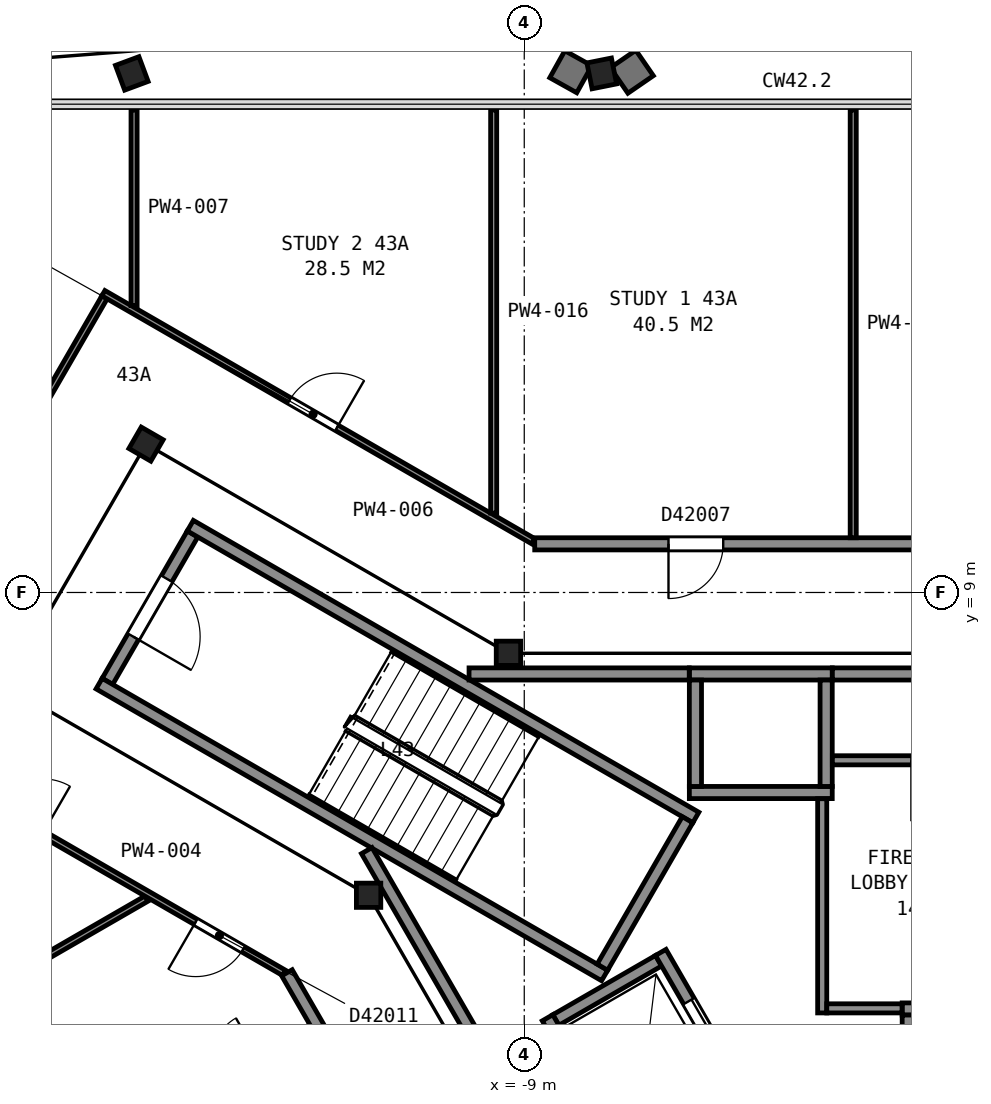
"""IFC4 building model, lengths in metres.
Left out: names, types, materials, properties, quantities, classifications, styles, units other than length and angle.
Written with IfcOpenShell. Run it as: python <this file> out.ifc"""

import sys

from ifc_helpers import new_model, si_unit, direction, frame, frame_2d, origin, origin_2d, place, context, subcontext, project, spatial, rectangle, i_section, extrude, element, fill, save


model = new_model("IFC4")
c1 = context("Model", 3, precision=1e-05, world=origin(), true_north=direction((0.0, 1.0)))
c2 = subcontext(c1, "Body", "Model", "MODEL_VIEW")
j1 = project(units=[si_unit("LENGTHUNIT", "METRE"), si_unit("PLANEANGLEUNIT", "RADIAN")], contexts=[c1])
p1 = place(None, origin())
s1 = spatial("IfcSite", under=j1, at=p1, CompositionType="ELEMENT")
p2 = place(p1, origin())
s2 = spatial("IfcBuilding", under=s1, at=p2, CompositionType="ELEMENT")
p3 = place(p2, frame((0.0, 0.0, 174.7)))
s3 = spatial("IfcBuildingStorey", under=s2, at=p3, CompositionType="ELEMENT", Elevation=174.7)
p4 = place(p3, frame((-7.681, 17.317, 0.035), z_axis=(-0.037114816882, 0.18577220621, 0.981891632395), x_axis=(0.999284884786, -0.000205075441, 0.037811069577)))
e1 = element("IfcColumn", 1, at=p4, inside=s3, PredefinedType="COLUMN", context=c2, shape_type="SweptSolid", body=[
    extrude(i_section(OverallWidth=0.411, OverallDepth=0.434, WebThickness=0.036, FlangeThickness=0.057, FilletRadius=0.015, at=origin_2d()), origin(), (0.0, 0.0, 1.0), 3.697),
])
p5 = place(p3, frame((-15.373, 17.318, 0.04), z_axis=(-0.06888386825, 0.185431142459, 0.980239921704), x_axis=(0.997540564772, 4.290776e-05, 0.070091510131)))
e2 = element("IfcColumn", 2, at=p5, inside=s3, PredefinedType="COLUMN", context=c2, shape_type="SweptSolid", body=[
    extrude(i_section(OverallWidth=0.411, OverallDepth=0.434, WebThickness=0.036, FlangeThickness=0.057, FilletRadius=0.015, at=origin_2d()), origin(), (0.0, 0.0, 1.0), 3.693),
])
p6 = place(p3, frame((-9.26, 8.0, 0.0), z_axis=(0.0, 0.0, 1.0), x_axis=(1.0, 0.0, 0.0)))
e3 = element("IfcColumn", 3, at=p6, inside=s3, PredefinedType="COLUMN", context=c2, shape_type="SweptSolid", body=[
    extrude(i_section(OverallWidth=0.401, OverallDepth=0.399, WebThickness=0.025, FlangeThickness=0.04, FilletRadius=0.015, at=origin_2d()), origin(), (0.0, 0.0, 1.0), 3.7),
])
p7 = place(p3, frame((-15.22, 11.44, 0.0), z_axis=(0.0, 0.0, 1.0), x_axis=(0.5, 0.866025403784, 0.0)))
e4 = element("IfcColumn", 4, at=p7, inside=s3, PredefinedType="COLUMN", context=c2, shape_type="SweptSolid", body=[
    extrude(i_section(OverallWidth=0.406, OverallDepth=0.417, WebThickness=0.03, FlangeThickness=0.048, FilletRadius=0.015, at=origin_2d()), origin(), (0.0, 0.0, 1.0), 3.7),
])
p8 = place(p3, frame((-11.56, 4.02, 0.0), z_axis=(0.0, 0.0, 1.0), x_axis=(1.0, 0.0, 0.0)))
e5 = element("IfcColumn", 5, at=p8, inside=s3, PredefinedType="COLUMN", context=c2, shape_type="SweptSolid", body=[
    extrude(i_section(OverallWidth=0.401, OverallDepth=0.399, WebThickness=0.025, FlangeThickness=0.04, FilletRadius=0.015, at=origin_2d()), origin(), (0.0, 0.0, 1.0), 3.7),
])
p9 = place(p3, frame((-14.455, 9.962, 0.0), z_axis=(0.0, 0.0, 1.0), x_axis=(-0.500049511043, -0.865996816683, 0.0)))
e6 = element("IfcWall", 6, at=p9, inside=s3, PredefinedType="PARTITIONING", context=c2, shape_type="SweptSolid", body=[
    extrude(rectangle(XDim=2.8, YDim=0.2, at=frame_2d((1.4, 0.0))), origin(), (0.0, 0.0, 1.0), 3.45),
])
p10 = place(p9, frame((0.85, 0.0, 0.0)))
e7 = element("IfcOpeningElement", 7, at=p10, cuts=e6, PredefinedType="OPENING", context=c2, shape_type="SweptSolid", body=[
    extrude(rectangle(XDim=1.1, YDim=2.1, at=frame_2d((0.55, 1.05))), frame((0.0, 0.11, 0.0), z_axis=(0.0, -1.0, 0.0), x_axis=(1.0, 0.0, 0.0)), (0.0, 0.0, 1.0), 0.22),
])
for number, where, z_axis, x_axis in (
    (8, (-7.678, 2.701, 0.0), (0.0, 0.0, 1.0), (-0.866, 0.5, 0.0)),
    (9, (-6.178, 5.299, 0.0), (0.0, 0.0, 1.0), (-0.866, 0.5, 0.0)),
):
    element("IfcWall", number, at=place(p3, frame(where, z_axis=z_axis, x_axis=x_axis)), inside=s3, PredefinedType="PARTITIONING", context=c2, shape_type="SweptSolid", body=[
        extrude(rectangle(XDim=9.6, YDim=0.2, at=frame_2d((4.8, 0.0))), origin(), (0.0, 0.0, 1.0), 3.45),
    ])
p11 = place(p3, frame((-6.315, 5.262, 0.0), z_axis=(0.0, 0.0, 1.0), x_axis=(-0.500049511043, -0.865996816683, 0.0)))
e10 = element("IfcWall", 10, at=p11, inside=s3, PredefinedType="PARTITIONING", context=c2, shape_type="SweptSolid", body=[
    extrude(rectangle(XDim=2.8, YDim=0.2, at=frame_2d((1.4, 0.0))), origin(), (0.0, 0.0, 1.0), 3.45),
])
p12 = place(p3, frame((-2.785, 2.15, 0.0), z_axis=(0.0, 0.0, 1.0), x_axis=(1.0, 0.0, 0.0)))
e11 = element("IfcWall", 11, at=p12, inside=s3, PredefinedType="PARTITIONING", context=c2, shape_type="SweptSolid", body=[
    extrude(rectangle(XDim=2.95, YDim=0.2, at=frame_2d((1.475, 0.0))), origin(), (0.0, 0.0, 1.0), 3.7),
])
p13 = place(p12, frame((0.925, 0.0, 0.0)))
e12 = element("IfcOpeningElement", 12, at=p13, cuts=e11, PredefinedType="OPENING", context=c2, shape_type="SweptSolid", body=[
    extrude(rectangle(XDim=1.1, YDim=2.1, at=frame_2d((0.55, 1.05))), frame((0.0, 0.11, 0.0), z_axis=(0.0, -1.0, 0.0), x_axis=(1.0, 0.0, 0.0)), (0.0, 0.0, 1.0), 0.22),
])
for number, where, z_axis, x_axis in (
    (13, (-6.285, 5.71, 0.0), (0.0, 0.0, 1.0), (1.0, 0.0, 0.0)),
    (14, (-6.285, 7.66, 0.0), (0.0, 0.0, 1.0), (1.0, 0.0, 0.0)),
):
    element("IfcWall", number, at=place(p3, frame(where, z_axis=z_axis, x_axis=x_axis)), inside=s3, PredefinedType="PARTITIONING", context=c2, shape_type="SweptSolid", body=[
        extrude(rectangle(XDim=2.35, YDim=0.2, at=frame_2d((1.175, 0.0))), origin(), (0.0, 0.0, 1.0), 3.7),
    ])
for number, where, z_axis, x_axis in (
    (15, (-8.48, 1.969, 0.0), (0.0, 0.0, 1.0), (0.866, 0.5, 0.0)),
    (16, (-2.685, 0.1, 0.0), (0.0, 0.0, 1.0), (0.0, 1.0, 0.0)),
):
    element("IfcWall", number, at=place(p3, frame(where, z_axis=z_axis, x_axis=x_axis)), inside=s3, PredefinedType="PARTITIONING", context=c2, shape_type="SweptSolid", body=[
        extrude(rectangle(XDim=1.95, YDim=0.2, at=frame_2d((0.975, 0.0))), origin(), (0.0, 0.0, 1.0), 3.7),
    ])
for number, where, z_axis, x_axis in (
    (17, (-4.035, 5.81, 0.0), (0.0, 0.0, 1.0), (0.0, 1.0, 0.0)),
    (18, (-6.185, 5.81, 0.0), (0.0, 0.0, 1.0), (0.0, 1.0, 0.0)),
):
    element("IfcWall", number, at=place(p3, frame(where, z_axis=z_axis, x_axis=x_axis)), inside=s3, PredefinedType="PARTITIONING", context=c2, shape_type="SweptSolid", body=[
        extrude(rectangle(XDim=1.75, YDim=0.2, at=frame_2d((0.875, 0.0))), origin(), (0.0, 0.0, 1.0), 3.7),
    ])
p14 = place(p3, frame((-5.28, 0.525, 0.0), z_axis=(0.0, 0.0, 1.0), x_axis=(-0.500037662692, 0.866003658127, 0.0)))
e19 = element("IfcWall", 19, at=p14, inside=s3, PredefinedType="PARTITIONING", context=c2, shape_type="SweptSolid", body=[
    extrude(rectangle(XDim=2.95, YDim=0.2, at=frame_2d((1.475, 0.0))), origin(), (0.0, 0.0, 1.0), 3.7),
])
p15 = place(p14, frame((0.925, 0.0, 0.0)))
e20 = element("IfcOpeningElement", 20, at=p15, cuts=e19, PredefinedType="OPENING", context=c2, shape_type="SweptSolid", body=[
    extrude(rectangle(XDim=1.1, YDim=2.1, at=frame_2d((0.55, 1.05))), frame((0.0, 0.11, 0.0), z_axis=(0.0, -1.0, 0.0), x_axis=(1.0, 0.0, 0.0)), (0.0, 0.0, 1.0), 0.22),
])
p16 = place(p3, frame((-7.242, -0.376, 0.0), z_axis=(0.0, 0.0, 1.0), x_axis=(-0.499996545922, 0.866027397988, 0.0)))
e21 = element("IfcWall", 21, at=p16, inside=s3, PredefinedType="PARTITIONING", context=c2, shape_type="SweptSolid", body=[
    extrude(rectangle(XDim=2.75, YDim=0.2, at=frame_2d((1.375, 0.0))), origin(), (0.0, 0.0, 1.0), 3.7),
])
p17 = place(p3, frame((-11.591, 4.755, 0.0), z_axis=(0.0, 0.0, 1.0), x_axis=(0.500043977787, -0.866000011708, 0.0)))
e22 = element("IfcWall", 22, at=p17, inside=s3, PredefinedType="PARTITIONING", context=c2, shape_type="SweptSolid", body=[
    extrude(rectangle(XDim=6.617, YDim=0.2, at=frame_2d((3.308, 0.0))), origin(), (0.0, 0.0, 1.0), 3.45),
])
p18 = place(p17, frame((3.695, 0.0, 0.0)))
e23 = element("IfcOpeningElement", 23, at=p18, cuts=e22, PredefinedType="OPENING", context=c2, shape_type="SweptSolid", body=[
    extrude(rectangle(XDim=1.8, YDim=2.1, at=frame_2d((0.9, 1.05))), frame((0.0, 0.11, 0.0), z_axis=(0.0, -1.0, 0.0), x_axis=(1.0, 0.0, 0.0)), (0.0, 0.0, 1.0), 0.22),
])
p19 = place(p3, frame((-9.908, 7.66, 0.0), z_axis=(0.0, 0.0, 1.0), x_axis=(1.0, 0.0, 0.0)))
e24 = element("IfcWall", 24, at=p19, inside=s3, PredefinedType="PARTITIONING", context=c2, shape_type="SweptSolid", body=[
    extrude(rectangle(XDim=3.621, YDim=0.2, at=frame_2d((1.811, 0.0))), origin(), (0.0, 0.0, 1.0), 3.45),
])
p20 = place(p3, frame((-4.1, 2.085, 0.0), z_axis=(0.0, 0.0, 1.0), x_axis=(0.0, 1.0, 0.0)))
e25 = element("IfcWall", 25, at=p20, inside=s3, PredefinedType="PARTITIONING", context=c2, shape_type="SweptSolid", body=[
    extrude(rectangle(XDim=3.523, YDim=0.15, at=frame_2d((1.761, 0.0))), origin(), (0.0, 0.0, 1.0), 3.45),
])
p21 = place(p3, frame((-4.025, 2.16, 0.0), z_axis=(0.0, 0.0, 1.0), x_axis=(1.0, 0.0, 0.0)))
e26 = element("IfcWall", 26, at=p21, inside=s3, PredefinedType="PARTITIONING", context=c2, shape_type="SweptSolid", body=[
    extrude(rectangle(XDim=1.238, YDim=0.15, at=frame_2d((0.619, 0.0))), origin(), (0.0, 0.0, 1.0), 3.45),
])
p22 = place(p3, frame((-3.933, 6.24, 0.0), z_axis=(0.0, 0.0, 1.0), x_axis=(1.0, 0.0, 0.0)))
e27 = element("IfcWall", 27, at=p22, inside=s3, PredefinedType="PARTITIONING", context=c2, shape_type="SweptSolid", body=[
    extrude(rectangle(XDim=3.538, YDim=0.15, at=frame_2d((1.769, 0.0))), origin(), (0.0, 0.0, 1.0), 3.45),
])
p23 = place(p22, frame((1.3, 0.0, 0.0)))
e28 = element("IfcOpeningElement", 28, at=p23, cuts=e27, PredefinedType="OPENING", context=c2, shape_type="SweptSolid", body=[
    extrude(rectangle(XDim=1.0, YDim=2.1, at=frame_2d((0.5, 1.05))), frame((0.0, 0.085, 0.0), z_axis=(0.0, -1.0, 0.0), x_axis=(1.0, 0.0, 0.0)), (0.0, 0.0, 1.0), 0.17),
])
p24 = place(p3, frame((-3.933, 7.66, 0.0), z_axis=(0.0, 0.0, 1.0), x_axis=(1.0, 0.0, 0.0)))
e29 = element("IfcWall", 29, at=p24, inside=s3, PredefinedType="PARTITIONING", context=c2, shape_type="SweptSolid", body=[
    extrude(rectangle(XDim=13.841, YDim=0.2, at=frame_2d((6.92, 0.0))), origin(), (0.0, 0.0, 1.0), 3.45),
])
p25 = place(p3, frame((-20.187, 1.094, 0.0), z_axis=(0.0, 0.0, 1.0), x_axis=(0.866060256018, 0.499939629302, 0.0)))
e30 = element("IfcWall", 30, at=p25, inside=s3, PredefinedType="PARTITIONING", context=c2, shape_type="SweptSolid", body=[
    extrude(rectangle(XDim=5.741, YDim=0.1, at=frame_2d((2.871, 0.0))), origin(), (0.0, 0.0, 1.0), 2.713),
])
p26 = place(p3, frame((-19.955, 6.844, 0.0), z_axis=(0.0, 0.0, 1.0), x_axis=(0.500415732313, 0.865785247537, 0.0)))
e31 = element("IfcWall", 31, at=p26, inside=s3, PredefinedType="PARTITIONING", context=c2, shape_type="SweptSolid", body=[
    extrude(rectangle(XDim=8.097, YDim=0.1, at=frame_2d((4.049, 0.0))), origin(), (0.0, 0.0, 1.0), 2.713),
])
p27 = place(p26, frame((3.45, 0.0, 0.0)))
e32 = element("IfcOpeningElement", 32, at=p27, cuts=e31, PredefinedType="OPENING", context=c2, shape_type="SweptSolid", body=[
    extrude(rectangle(XDim=1.2, YDim=2.1, at=frame_2d((0.6, 1.05))), frame((0.0, 0.06, 0.0), z_axis=(0.0, -1.0, 0.0), x_axis=(1.0, 0.0, 0.0)), (0.0, 0.0, 1.0), 0.12),
])
p28 = place(p3, frame((-12.952, 2.744, 0.0), z_axis=(0.0, 0.0, 1.0), x_axis=(-0.86608949446, 0.499888975259, 0.0)))
e33 = element("IfcWall", 33, at=p28, inside=s3, PredefinedType="PARTITIONING", context=c2, shape_type="SweptSolid", body=[
    extrude(rectangle(XDim=8.165, YDim=0.1, at=frame_2d((4.083, 0.0))), origin(), (0.0, 0.0, 1.0), 2.713),
])
p29 = place(p28, frame((4.581, 0.0, 0.0)))
e34 = element("IfcOpeningElement", 34, at=p29, cuts=e33, PredefinedType="OPENING", context=c2, shape_type="SweptSolid", body=[
    extrude(rectangle(XDim=0.9, YDim=2.1, at=frame_2d((0.45, 1.05))), frame((0.0, 0.06, 0.0), z_axis=(0.0, -1.0, 0.0), x_axis=(1.0, 0.0, 0.0)), (0.0, 0.0, 1.0), 0.12),
])
p30 = place(p28, frame((0.776, 0.0, 0.0)))
e35 = element("IfcOpeningElement", 35, at=p30, cuts=e33, PredefinedType="OPENING", context=c2, shape_type="SweptSolid", body=[
    extrude(rectangle(XDim=0.9, YDim=2.1, at=frame_2d((0.45, 1.05))), frame((0.0, 0.06, 0.0), z_axis=(0.0, -1.0, 0.0), x_axis=(1.0, 0.0, 0.0)), (0.0, 0.0, 1.0), 0.12),
])
p31 = place(p3, frame((-15.921, 13.923, 0.0), z_axis=(0.0, 0.0, 1.0), x_axis=(0.866088973199, -0.499889878377, 0.0)))
e36 = element("IfcWall", 36, at=p31, inside=s3, PredefinedType="PARTITIONING", context=c2, shape_type="SweptSolid", body=[
    extrude(rectangle(XDim=8.163, YDim=0.1, at=frame_2d((4.082, 0.0))), origin(), (0.0, 0.0, 1.0), 2.713),
])
p32 = place(p31, frame((3.532, 0.0, 0.0)))
e37 = element("IfcOpeningElement", 37, at=p32, cuts=e36, PredefinedType="OPENING", context=c2, shape_type="SweptSolid", body=[
    extrude(rectangle(XDim=0.9, YDim=2.1, at=frame_2d((0.45, 1.05))), frame((0.0, 0.06, 0.0), z_axis=(0.0, -1.0, 0.0), x_axis=(1.0, 0.0, 0.0)), (0.0, 0.0, 1.0), 0.12),
])
p33 = place(p3, frame((-15.417, 13.719, 0.0), z_axis=(0.0, 0.0, 1.0), x_axis=(0.0, 1.0, 0.0)))
e38 = element("IfcWall", 38, at=p33, inside=s3, PredefinedType="PARTITIONING", context=c2, shape_type="SweptSolid", body=[
    extrude(rectangle(XDim=3.217, YDim=0.1, at=frame_2d((1.608, 0.0))), origin(), (0.0, 0.0, 1.0), 2.713),
])
p34 = place(p3, frame((-12.481, 1.805, 0.0), z_axis=(0.0, 0.0, 1.0), x_axis=(-0.866052556263, -0.499952967579, 0.0)))
e39 = element("IfcWall", 39, at=p34, inside=s3, PredefinedType="PARTITIONING", context=c2, shape_type="SweptSolid", body=[
    extrude(rectangle(XDim=2.995, YDim=0.2, at=frame_2d((1.498, 0.0))), origin(), (0.0, 0.0, 1.0), 2.713),
])
p35 = place(p34, frame((0.995, 0.0, 0.0)))
e40 = element("IfcOpeningElement", 40, at=p35, cuts=e39, PredefinedType="OPENING", context=c2, shape_type="SweptSolid", body=[
    extrude(rectangle(XDim=0.8, YDim=2.1, at=frame_2d((0.4, 1.05))), frame((0.0, 0.11, 0.0), z_axis=(0.0, -1.0, 0.0), x_axis=(1.0, 0.0, 0.0)), (0.0, 0.0, 1.0), 0.22),
])
p36 = place(p3, frame((-4.075, -12.545, 0.0), z_axis=(0.0, 0.0, 1.0), x_axis=(-0.499999743747, 0.866025551732, 0.0)))
e41 = element("IfcWall", 41, at=p36, inside=s3, PredefinedType="PARTITIONING", context=c2, shape_type="SweptSolid", body=[
    extrude(rectangle(XDim=17.656, YDim=0.2, at=frame_2d((8.828, 0.0))), origin(), (0.0, 0.0, 1.0), 2.713),
])
p37 = place(p36, frame((10.08, 0.0, 0.0)))
e42 = element("IfcOpeningElement", 42, at=p37, cuts=e41, PredefinedType="OPENING", context=c2, shape_type="SweptSolid", body=[
    extrude(rectangle(XDim=0.9, YDim=2.1, at=frame_2d((0.45, 1.05))), frame((0.0, 0.11, 0.0), z_axis=(0.0, -1.0, 0.0), x_axis=(1.0, 0.0, 0.0)), (0.0, 0.0, 1.0), 0.22),
])
p38 = place(p36, frame((6.068, 0.0, 0.0)))
e43 = element("IfcOpeningElement", 43, at=p38, cuts=e41, PredefinedType="OPENING", context=c2, shape_type="SweptSolid", body=[
    extrude(rectangle(XDim=0.9, YDim=2.1, at=frame_2d((0.45, 1.05))), frame((0.0, 0.11, 0.0), z_axis=(0.0, -1.0, 0.0), x_axis=(1.0, 0.0, 0.0)), (0.0, 0.0, 1.0), 0.22),
])
p39 = place(p3, frame((-9.503, 10.306, 0.0), z_axis=(0.0, 0.0, 1.0), x_axis=(0.0, 1.0, 0.0)))
e44 = element("IfcWall", 44, at=p39, inside=s3, PredefinedType="PARTITIONING", context=c2, shape_type="SweptSolid", body=[
    extrude(rectangle(XDim=6.629, YDim=0.1, at=frame_2d((3.315, 0.0))), origin(), (0.0, 0.0, 1.0), 2.713),
])
p40 = place(p3, frame((-8.828, 9.8, 0.0), z_axis=(0.0, 0.0, 1.0), x_axis=(1.0, 0.0, 0.0)))
e45 = element("IfcWall", 45, at=p40, inside=s3, PredefinedType="PARTITIONING", context=c2, shape_type="SweptSolid", body=[
    extrude(rectangle(XDim=17.656, YDim=0.2, at=frame_2d((8.828, 0.0))), origin(), (0.0, 0.0, 1.0), 2.713),
])
p41 = place(p40, frame((14.864, 0.0, 0.0)))
e46 = element("IfcOpeningElement", 46, at=p41, cuts=e45, PredefinedType="OPENING", context=c2, shape_type="SweptSolid", body=[
    extrude(rectangle(XDim=0.9, YDim=2.1, at=frame_2d((0.45, 1.05))), frame((0.0, 0.11, 0.0), z_axis=(0.0, -1.0, 0.0), x_axis=(1.0, 0.0, 0.0)), (0.0, 0.0, 1.0), 0.22),
])
p42 = place(p40, frame((6.488, 0.0, 0.0)))
e47 = element("IfcOpeningElement", 47, at=p42, cuts=e45, PredefinedType="OPENING", context=c2, shape_type="SweptSolid", body=[
    extrude(rectangle(XDim=0.9, YDim=2.1, at=frame_2d((0.45, 1.05))), frame((0.0, 0.11, 0.0), z_axis=(0.0, -1.0, 0.0), x_axis=(1.0, 0.0, 0.0)), (0.0, 0.0, 1.0), 0.22),
])
p43 = place(p40, frame((2.2, 0.0, 0.0)))
e48 = element("IfcOpeningElement", 48, at=p43, cuts=e45, PredefinedType="OPENING", context=c2, shape_type="SweptSolid", body=[
    extrude(rectangle(XDim=0.9, YDim=2.1, at=frame_2d((0.45, 1.05))), frame((0.0, 0.11, 0.0), z_axis=(0.0, -1.0, 0.0), x_axis=(1.0, 0.0, 0.0)), (0.0, 0.0, 1.0), 0.22),
])
p44 = place(p3, frame((-3.59, 9.9, 0.0), z_axis=(0.0, 0.0, 1.0), x_axis=(0.0, 1.0, 0.0)))
e49 = element("IfcWall", 49, at=p44, inside=s3, PredefinedType="PARTITIONING", context=c2, shape_type="SweptSolid", body=[
    extrude(rectangle(XDim=7.035, YDim=0.1, at=frame_2d((3.518, 0.0))), origin(), (0.0, 0.0, 1.0), 2.713),
])
p45 = place(p10, origin())
e50 = element("IfcDoor", 50, at=p45, inside=s3, OperationType="SINGLE_SWING_RIGHT", PredefinedType="DOOR", context=c2, shape_type="SweptSolid", body=[
    extrude(rectangle(XDim=1.1, YDim=2.1, at=frame_2d((0.55, 1.05))), frame((0.0, 0.025, 0.0), z_axis=(0.0, -1.0, 0.0), x_axis=(1.0, 0.0, 0.0)), (0.0, 0.0, 1.0), 0.05),
])
fill(e7, e50)
p46 = place(p15, origin())
e51 = element("IfcDoor", 51, at=p46, inside=s3, OperationType="SLIDING_TO_LEFT", PredefinedType="DOOR", context=c2, shape_type="SweptSolid", body=[
    extrude(rectangle(XDim=1.1, YDim=2.1, at=frame_2d((0.55, 1.05))), frame((0.0, 0.025, 0.0), z_axis=(0.0, -1.0, 0.0), x_axis=(1.0, 0.0, 0.0)), (0.0, 0.0, 1.0), 0.05),
])
fill(e20, e51)
p47 = place(p30, origin())
e52 = element("IfcDoor", 52, at=p47, inside=s3, OperationType="SINGLE_SWING_RIGHT", PredefinedType="DOOR", context=c2, shape_type="SweptSolid", body=[
    extrude(rectangle(XDim=0.9, YDim=2.1, at=frame_2d((0.45, 1.05))), frame((0.0, 0.025, 0.0), z_axis=(0.0, -1.0, 0.0), x_axis=(1.0, 0.0, 0.0)), (0.0, 0.0, 1.0), 0.05),
])
fill(e35, e52)
p48 = place(p32, origin())
e53 = element("IfcDoor", 53, at=p48, inside=s3, OperationType="SINGLE_SWING_RIGHT", PredefinedType="DOOR", context=c2, shape_type="SweptSolid", body=[
    extrude(rectangle(XDim=0.9, YDim=2.1, at=frame_2d((0.45, 1.05))), frame((0.0, 0.025, 0.0), z_axis=(0.0, -1.0, 0.0), x_axis=(1.0, 0.0, 0.0)), (0.0, 0.0, 1.0), 0.05),
])
fill(e37, e53)
p49 = place(p43, origin())
e54 = element("IfcDoor", 54, at=p49, inside=s3, OperationType="SINGLE_SWING_LEFT", PredefinedType="DOOR", context=c2, shape_type="SweptSolid", body=[
    extrude(rectangle(XDim=0.9, YDim=2.1, at=frame_2d((0.45, 1.05))), frame((0.0, 0.025, 0.0), z_axis=(0.0, -1.0, 0.0), x_axis=(1.0, 0.0, 0.0)), (0.0, 0.0, 1.0), 0.05),
])
fill(e48, e54)
save(model, sys.argv[1])
